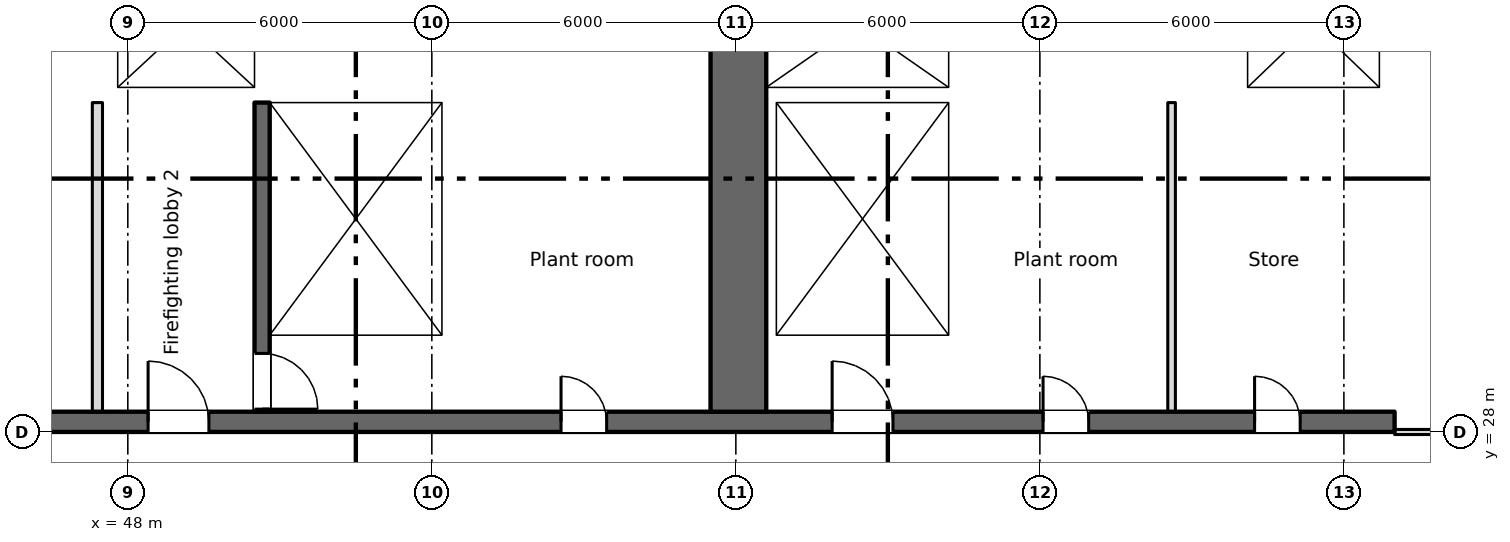
"""IFC4 building model, lengths in metres.
Left out: names, types, materials, properties, quantities, classifications, styles, units other than length and angle.
Written with IfcOpenShell. Run it as: python <this file> out.ifc"""

import sys

from ifc_helpers import new_model, si_unit, direction, frame, frame_2d, origin, place, context, subcontext, project, spatial, rectangle, extrude, element, fill, save


model = new_model("IFC4")
c1 = context("Model", 3, precision=1e-05, world=origin(), true_north=direction((0.0, 1.0)))
c2 = subcontext(c1, "Body", "Model", "MODEL_VIEW")
j1 = project(units=[si_unit("LENGTHUNIT", "METRE"), si_unit("PLANEANGLEUNIT", "RADIAN")], contexts=[c1])
p1 = place(None, origin())
s1 = spatial("IfcSite", under=j1, at=p1, CompositionType="ELEMENT")
p2 = place(p1, origin())
s2 = spatial("IfcBuilding", under=s1, at=p2, CompositionType="ELEMENT")
p3 = place(p2, frame((0.0, 0.0, -6.0)))
s3 = spatial("IfcBuildingStorey", under=s2, at=p3, CompositionType="ELEMENT", Elevation=-6.0)
p4 = place(p3, frame((6.7, 28.2, 0.0), z_axis=(0.0, 0.0, 1.0), x_axis=(1.0, 0.0, 0.0)))
e1 = element("IfcWall", 1, at=p4, inside=s3, PredefinedType="SHEAR", context=c2, shape_type="SweptSolid", body=[
    extrude(rectangle(XDim=66.3, YDim=0.4, at=frame_2d((33.15, 0.0))), origin(), (0.0, 0.0, 1.0), 5.55),
])
p5 = place(p4, frame((13.85, 0.0, 0.0)))
e2 = element("IfcOpeningElement", 2, at=p5, cuts=e1, PredefinedType="OPENING", context=c2, shape_type="SweptSolid", body=[
    extrude(rectangle(XDim=0.9, YDim=2.1, at=frame_2d((0.45, 1.05))), frame((0.0, 0.21, 0.0), z_axis=(0.0, -1.0, 0.0), x_axis=(1.0, 0.0, 0.0)), (0.0, 0.0, 1.0), 0.42),
])
p6 = place(p4, frame((49.85, 0.0, 0.0)))
e3 = element("IfcOpeningElement", 3, at=p6, cuts=e1, PredefinedType="OPENING", context=c2, shape_type="SweptSolid", body=[
    extrude(rectangle(XDim=0.9, YDim=2.1, at=frame_2d((0.45, 1.05))), frame((0.0, 0.21, 0.0), z_axis=(0.0, -1.0, 0.0), x_axis=(1.0, 0.0, 0.0)), (0.0, 0.0, 1.0), 0.42),
])
p7 = place(p4, frame((1.35, 0.0, 0.0)))
e4 = element("IfcOpeningElement", 4, at=p7, cuts=e1, PredefinedType="OPENING", context=c2, shape_type="SweptSolid", body=[
    extrude(rectangle(XDim=0.9, YDim=2.1, at=frame_2d((0.45, 1.05))), frame((0.0, 0.21, 0.0), z_axis=(0.0, -1.0, 0.0), x_axis=(1.0, 0.0, 0.0)), (0.0, 0.0, 1.0), 0.42),
])
p8 = place(p4, frame((59.363, 0.0, 0.0)))
e5 = element("IfcOpeningElement", 5, at=p8, cuts=e1, PredefinedType="OPENING", context=c2, shape_type="SweptSolid", body=[
    extrude(rectangle(XDim=0.9, YDim=2.1, at=frame_2d((0.45, 1.05))), frame((0.0, 0.21, 0.0), z_axis=(0.0, -1.0, 0.0), x_axis=(1.0, 0.0, 0.0)), (0.0, 0.0, 1.0), 0.42),
])
p9 = place(p4, frame((63.538, 0.0, 0.0)))
e6 = element("IfcOpeningElement", 6, at=p9, cuts=e1, PredefinedType="OPENING", context=c2, shape_type="SweptSolid", body=[
    extrude(rectangle(XDim=0.9, YDim=2.1, at=frame_2d((0.45, 1.05))), frame((0.0, 0.21, 0.0), z_axis=(0.0, -1.0, 0.0), x_axis=(1.0, 0.0, 0.0)), (0.0, 0.0, 1.0), 0.42),
])
p10 = place(p4, frame((4.7, 0.0, 0.0)))
e7 = element("IfcOpeningElement", 7, at=p10, cuts=e1, PredefinedType="OPENING", context=c2, shape_type="SweptSolid", body=[
    extrude(rectangle(XDim=1.2, YDim=2.1, at=frame_2d((0.6, 1.05))), frame((0.0, 0.21, 0.0), z_axis=(0.0, -1.0, 0.0), x_axis=(1.0, 0.0, 0.0)), (0.0, 0.0, 1.0), 0.42),
])
p11 = place(p4, frame((31.7, 0.0, 0.0)))
e8 = element("IfcOpeningElement", 8, at=p11, cuts=e1, PredefinedType="OPENING", context=c2, shape_type="SweptSolid", body=[
    extrude(rectangle(XDim=1.2, YDim=2.1, at=frame_2d((0.6, 1.05))), frame((0.0, 0.21, 0.0), z_axis=(0.0, -1.0, 0.0), x_axis=(1.0, 0.0, 0.0)), (0.0, 0.0, 1.0), 0.42),
])
p12 = place(p4, frame((55.2, 0.0, 0.0)))
e9 = element("IfcOpeningElement", 9, at=p12, cuts=e1, PredefinedType="OPENING", context=c2, shape_type="SweptSolid", body=[
    extrude(rectangle(XDim=1.2, YDim=2.1, at=frame_2d((0.6, 1.05))), frame((0.0, 0.21, 0.0), z_axis=(0.0, -1.0, 0.0), x_axis=(1.0, 0.0, 0.0)), (0.0, 0.0, 1.0), 0.42),
])
p13 = place(p4, frame((21.7, 0.0, 0.0)))
e10 = element("IfcOpeningElement", 10, at=p13, cuts=e1, PredefinedType="OPENING", context=c2, shape_type="SweptSolid", body=[
    extrude(rectangle(XDim=1.2, YDim=2.1, at=frame_2d((0.6, 1.05))), frame((0.0, 0.21, 0.0), z_axis=(0.0, -1.0, 0.0), x_axis=(1.0, 0.0, 0.0)), (0.0, 0.0, 1.0), 0.42),
])
p14 = place(p4, frame((41.7, 0.0, 0.0)))
e11 = element("IfcOpeningElement", 11, at=p14, cuts=e1, PredefinedType="OPENING", context=c2, shape_type="SweptSolid", body=[
    extrude(rectangle(XDim=1.2, YDim=2.1, at=frame_2d((0.6, 1.05))), frame((0.0, 0.21, 0.0), z_axis=(0.0, -1.0, 0.0), x_axis=(1.0, 0.0, 0.0)), (0.0, 0.0, 1.0), 0.42),
])
p15 = place(p4, frame((24.85, 0.0, 0.0)))
e12 = element("IfcOpeningElement", 12, at=p15, cuts=e1, PredefinedType="OPENING", context=c2, shape_type="SweptSolid", body=[
    extrude(rectangle(XDim=2.4, YDim=2.1, at=frame_2d((1.2, 1.05))), frame((0.0, 0.21, 0.0), z_axis=(0.0, -1.0, 0.0), x_axis=(1.0, 0.0, 0.0)), (0.0, 0.0, 1.0), 0.42),
])
p16 = place(p4, frame((37.35, 0.0, 0.0)))
e13 = element("IfcOpeningElement", 13, at=p16, cuts=e1, PredefinedType="OPENING", context=c2, shape_type="SweptSolid", body=[
    extrude(rectangle(XDim=2.4, YDim=2.1, at=frame_2d((1.2, 1.05))), frame((0.0, 0.21, 0.0), z_axis=(0.0, -1.0, 0.0), x_axis=(1.0, 0.0, 0.0)), (0.0, 0.0, 1.0), 0.42),
])
p17 = place(p4, frame((7.8, 0.0, 0.0)))
e14 = element("IfcOpeningElement", 14, at=p17, cuts=e1, PredefinedType="OPENING", context=c2, shape_type="SweptSolid", body=[
    extrude(rectangle(XDim=2.4, YDim=2.1, at=frame_2d((1.2, 1.05))), frame((0.0, 0.21, 0.0), z_axis=(0.0, -1.0, 0.0), x_axis=(1.0, 0.0, 0.0)), (0.0, 0.0, 1.0), 0.42),
])
p18 = place(p4, frame((28.85, 0.0, 0.0)))
e15 = element("IfcOpeningElement", 15, at=p18, cuts=e1, PredefinedType="OPENING", context=c2, shape_type="SweptSolid", body=[
    extrude(rectangle(XDim=0.9, YDim=2.1, at=frame_2d((0.45, 1.05))), frame((0.0, 0.21, 0.0), z_axis=(0.0, -1.0, 0.0), x_axis=(1.0, 0.0, 0.0)), (0.0, 0.0, 1.0), 0.42),
])
p19 = place(p4, frame((34.85, 0.0, 0.0)))
e16 = element("IfcOpeningElement", 16, at=p19, cuts=e1, PredefinedType="OPENING", context=c2, shape_type="SweptSolid", body=[
    extrude(rectangle(XDim=0.9, YDim=2.1, at=frame_2d((0.45, 1.05))), frame((0.0, 0.21, 0.0), z_axis=(0.0, -1.0, 0.0), x_axis=(1.0, 0.0, 0.0)), (0.0, 0.0, 1.0), 0.42),
])
p20 = place(p3, frame((72.85, 28.4, 0.0), z_axis=(0.0, 0.0, 1.0), x_axis=(0.0, 1.0, 0.0)))
e17 = element("IfcWall", 17, at=p20, inside=s3, PredefinedType="SHEAR", context=c2, shape_type="SweptSolid", body=[
    extrude(rectangle(XDim=17.1, YDim=0.3, at=frame_2d((8.55, 0.0))), origin(), (0.0, 0.0, 1.0), 5.55),
])
p21 = place(p3, frame((64.35, 34.8, 0.0), z_axis=(0.0, 0.0, 1.0), x_axis=(0.0, 1.0, 0.0)))
e18 = element("IfcWall", 18, at=p21, inside=s3, PredefinedType="SHEAR", context=c2, shape_type="SweptSolid", body=[
    extrude(rectangle(XDim=2.5, YDim=0.3, at=frame_2d((1.25, 0.0))), origin(), (0.0, 0.0, 1.0), 5.55),
])
p22 = place(p3, frame((60.05, 28.4, 0.0), z_axis=(0.0, 0.0, 1.0), x_axis=(0.0, 1.0, 0.0)))
e19 = element("IfcWall", 19, at=p22, inside=s3, PredefinedType="SHEAR", context=c2, shape_type="SweptSolid", body=[
    extrude(rectangle(XDim=17.1, YDim=1.1, at=frame_2d((8.55, 0.0))), origin(), (0.0, 0.0, 1.0), 5.55),
])
p23 = place(p22, frame((9.6, 0.0, 0.0)))
e20 = element("IfcOpeningElement", 20, at=p23, cuts=e19, PredefinedType="OPENING", context=c2, shape_type="SweptSolid", body=[
    extrude(rectangle(XDim=2.0, YDim=2.1, at=frame_2d((1.0, 1.05))), frame((0.0, 0.56, 0.0), z_axis=(0.0, -1.0, 0.0), x_axis=(1.0, 0.0, 0.0)), (0.0, 0.0, 1.0), 1.12),
])
p24 = place(p22, frame((15.45, 0.0, 0.0)))
e21 = element("IfcOpeningElement", 21, at=p24, cuts=e19, PredefinedType="OPENING", context=c2, shape_type="SweptSolid", body=[
    extrude(rectangle(XDim=1.2, YDim=2.1, at=frame_2d((0.6, 1.05))), frame((0.0, 0.56, 0.0), z_axis=(0.0, -1.0, 0.0), x_axis=(1.0, 0.0, 0.0)), (0.0, 0.0, 1.0), 1.12),
])
p25 = place(p3, frame((50.65, 34.5, 0.0), z_axis=(0.0, 0.0, 1.0), x_axis=(0.0, -1.0, 0.0)))
e22 = element("IfcWall", 22, at=p25, inside=s3, PredefinedType="SHEAR", context=c2, shape_type="SweptSolid", body=[
    extrude(rectangle(XDim=6.1, YDim=0.3, at=frame_2d((3.05, 0.0))), origin(), (0.0, 0.0, 1.0), 5.55),
])
p26 = place(p25, frame((4.95, 0.0, 0.0)))
e23 = element("IfcOpeningElement", 23, at=p26, cuts=e22, PredefinedType="OPENING", context=c2, shape_type="SweptSolid", body=[
    extrude(rectangle(XDim=1.1, YDim=2.1, at=frame_2d((0.55, 1.05))), frame((0.0, 0.16, 0.0), z_axis=(0.0, -1.0, 0.0), x_axis=(1.0, 0.0, 0.0)), (0.0, 0.0, 1.0), 0.32),
])
p27 = place(p3, frame((54.35, 28.4, 0.0), z_axis=(0.0, 0.0, 1.0), x_axis=(0.0, 1.0, 0.0)))
e24 = element("IfcWall", 24, at=p27, inside=s3, PredefinedType="SHEAR", context=c2, shape_type="SweptSolid", body=[
    extrude(rectangle(XDim=6.1, YDim=0.3, at=frame_2d((3.05, 0.0))), origin(), (0.0, 0.0, 1.0), 5.55),
])
p28 = place(p3, frame((60.7, 28.4, 0.0), z_axis=(0.0, 0.0, 1.0), x_axis=(0.0, 1.0, 0.0)))
e25 = element("IfcWall", 25, at=p28, inside=s3, PredefinedType="SHEAR", context=c2, shape_type="SweptSolid", body=[
    extrude(rectangle(XDim=6.1, YDim=0.2, at=frame_2d((3.05, 0.0))), origin(), (0.0, 0.0, 1.0), 5.55),
])
p29 = place(p3, frame((64.35, 28.4, 0.0), z_axis=(0.0, 0.0, 1.0), x_axis=(0.0, 1.0, 0.0)))
e26 = element("IfcWall", 26, at=p29, inside=s3, PredefinedType="SHEAR", context=c2, shape_type="SweptSolid", body=[
    extrude(rectangle(XDim=6.1, YDim=0.3, at=frame_2d((3.05, 0.0))), origin(), (0.0, 0.0, 1.0), 5.55),
])
p30 = place(p3, frame((47.3, 34.65, 0.0), z_axis=(0.0, 0.0, 1.0), x_axis=(1.0, 0.0, 0.0)))
e27 = element("IfcWall", 27, at=p30, inside=s3, PredefinedType="SHEAR", context=c2, shape_type="SweptSolid", body=[
    extrude(rectangle(XDim=12.2, YDim=0.3, at=frame_2d((6.1, 0.0))), origin(), (0.0, 0.0, 1.0), 5.55),
])
p31 = place(p30, frame((1.3, 0.0, 0.0)))
e28 = element("IfcOpeningElement", 28, at=p31, cuts=e27, PredefinedType="OPENING", context=c2, shape_type="SweptSolid", body=[
    extrude(rectangle(XDim=1.1, YDim=2.1, at=frame_2d((0.55, 1.05))), frame((0.0, 0.16, 0.0), z_axis=(0.0, -1.0, 0.0), x_axis=(1.0, 0.0, 0.0)), (0.0, 0.0, 1.0), 0.32),
])
p32 = place(p3, frame((60.6, 34.65, 0.0), z_axis=(0.0, 0.0, 1.0), x_axis=(1.0, 0.0, 0.0)))
e29 = element("IfcWall", 29, at=p32, inside=s3, PredefinedType="SHEAR", context=c2, shape_type="SweptSolid", body=[
    extrude(rectangle(XDim=12.1, YDim=0.3, at=frame_2d((6.05, 0.0))), origin(), (0.0, 0.0, 1.0), 5.55),
])
p33 = place(p3, frame((47.55, 34.8, 0.0), z_axis=(0.0, 0.0, 1.0), x_axis=(0.0, 1.0, 0.0)))
e30 = element("IfcWall", 30, at=p33, inside=s3, PredefinedType="SHEAR", context=c2, shape_type="SweptSolid", body=[
    extrude(rectangle(XDim=2.5, YDim=0.5, at=frame_2d((1.25, 0.0))), origin(), (0.0, 0.0, 1.0), 5.55),
])
for number, where, z_axis, x_axis in (
    (31, (50.65, 34.8, 0.0), (0.0, 0.0, 1.0), (0.0, 1.0, 0.0)),
    (32, (67.15, 34.8, 0.0), (0.0, 0.0, 1.0), (0.0, 1.0, 0.0)),
    (33, (69.95, 34.8, 0.0), (0.0, 0.0, 1.0), (0.0, 1.0, 0.0)),
):
    element("IfcWall", number, at=place(p3, frame(where, z_axis=z_axis, x_axis=x_axis)), inside=s3, PredefinedType="SHEAR", context=c2, shape_type="SweptSolid", body=[
        extrude(rectangle(XDim=2.5, YDim=0.3, at=frame_2d((1.25, 0.0))), origin(), (0.0, 0.0, 1.0), 5.55),
    ])
p34 = place(p3, frame((47.4, 28.4, 0.0), z_axis=(0.0, 0.0, 1.0), x_axis=(0.0, 1.0, 0.0)))
e34 = element("IfcWall", 34, at=p34, inside=s3, PredefinedType="PARTITIONING", context=c2, shape_type="SweptSolid", body=[
    extrude(rectangle(XDim=6.1, YDim=0.2, at=frame_2d((3.05, 0.0))), origin(), (0.0, 0.0, 1.0), 5.55),
])
p35 = place(p3, frame((68.6, 28.4, 0.0), z_axis=(0.0, 0.0, 1.0), x_axis=(0.0, 1.0, 0.0)))
e35 = element("IfcWall", 35, at=p35, inside=s3, PredefinedType="PARTITIONING", context=c2, shape_type="SweptSolid", body=[
    extrude(rectangle(XDim=6.1, YDim=0.15, at=frame_2d((3.05, 0.0))), origin(), (0.0, 0.0, 1.0), 5.55),
])
p36 = place(p3, frame((73.0, 28.0, 0.0), z_axis=(0.0, 0.0, 1.0), x_axis=(1.0, 0.0, 0.0)))
e36 = element("IfcWall", 36, at=p36, inside=s3, PredefinedType="PARTITIONING", context=c2, shape_type="SweptSolid", body=[
    extrude(rectangle(XDim=6.0, YDim=0.1, at=frame_2d((3.0, 0.0))), origin(), (0.0, 0.0, 1.0), 5.55),
])
p37 = place(p36, frame((2.5, 0.0, 0.0)))
e37 = element("IfcOpeningElement", 37, at=p37, cuts=e36, PredefinedType="OPENING", context=c2, shape_type="SweptSolid", body=[
    extrude(rectangle(XDim=1.0, YDim=2.1, at=frame_2d((0.5, 1.05))), frame((0.0, 0.06, 0.0), z_axis=(0.0, -1.0, 0.0), x_axis=(1.0, 0.0, 0.0)), (0.0, 0.0, 1.0), 0.12),
])
p38 = place(p6, origin())
e38 = element("IfcDoor", 38, at=p38, inside=s3, OperationType="SINGLE_SWING_LEFT", PredefinedType="DOOR", context=c2, shape_type="SweptSolid", body=[
    extrude(rectangle(XDim=0.9, YDim=2.1, at=frame_2d((0.45, 1.05))), frame((0.0, 0.025, 0.0), z_axis=(0.0, -1.0, 0.0), x_axis=(1.0, 0.0, 0.0)), (0.0, 0.0, 1.0), 0.05),
])
fill(e3, e38)
p39 = place(p8, origin())
e39 = element("IfcDoor", 39, at=p39, inside=s3, OperationType="SINGLE_SWING_LEFT", PredefinedType="DOOR", context=c2, shape_type="SweptSolid", body=[
    extrude(rectangle(XDim=0.9, YDim=2.1, at=frame_2d((0.45, 1.05))), frame((0.0, 0.025, 0.0), z_axis=(0.0, -1.0, 0.0), x_axis=(1.0, 0.0, 0.0)), (0.0, 0.0, 1.0), 0.05),
])
fill(e5, e39)
p40 = place(p9, origin())
e40 = element("IfcDoor", 40, at=p40, inside=s3, OperationType="SINGLE_SWING_LEFT", PredefinedType="DOOR", context=c2, shape_type="SweptSolid", body=[
    extrude(rectangle(XDim=0.9, YDim=2.1, at=frame_2d((0.45, 1.05))), frame((0.0, 0.025, 0.0), z_axis=(0.0, -1.0, 0.0), x_axis=(1.0, 0.0, 0.0)), (0.0, 0.0, 1.0), 0.05),
])
fill(e6, e40)
p41 = place(p31, origin())
e41 = element("IfcDoor", 41, at=p41, inside=s3, OperationType="SLIDING_TO_LEFT", PredefinedType="DOOR", context=c2, shape_type="SweptSolid", body=[
    extrude(rectangle(XDim=1.1, YDim=2.1, at=frame_2d((0.55, 1.05))), frame((0.0, 0.025, 0.0), z_axis=(0.0, -1.0, 0.0), x_axis=(1.0, 0.0, 0.0)), (0.0, 0.0, 1.0), 0.05),
])
fill(e28, e41)
p42 = place(p26, origin())
e42 = element("IfcDoor", 42, at=p42, inside=s3, OperationType="SINGLE_SWING_RIGHT", PredefinedType="DOOR", context=c2, shape_type="SweptSolid", body=[
    extrude(rectangle(XDim=1.1, YDim=2.1, at=frame_2d((0.55, 1.05))), frame((0.0, 0.025, 0.0), z_axis=(0.0, -1.0, 0.0), x_axis=(1.0, 0.0, 0.0)), (0.0, 0.0, 1.0), 0.05),
])
fill(e23, e42)
p43 = place(p12, origin())
e43 = element("IfcDoor", 43, at=p43, inside=s3, OperationType="SINGLE_SWING_LEFT", PredefinedType="DOOR", context=c2, shape_type="SweptSolid", body=[
    extrude(rectangle(XDim=1.2, YDim=2.1, at=frame_2d((0.6, 1.05))), frame((0.0, 0.025, 0.0), z_axis=(0.0, -1.0, 0.0), x_axis=(1.0, 0.0, 0.0)), (0.0, 0.0, 1.0), 0.05),
])
fill(e9, e43)
p44 = place(p14, origin())
e44 = element("IfcDoor", 44, at=p44, inside=s3, OperationType="SINGLE_SWING_LEFT", PredefinedType="DOOR", context=c2, shape_type="SweptSolid", body=[
    extrude(rectangle(XDim=1.2, YDim=2.1, at=frame_2d((0.6, 1.05))), frame((0.0, 0.025, 0.0), z_axis=(0.0, -1.0, 0.0), x_axis=(1.0, 0.0, 0.0)), (0.0, 0.0, 1.0), 0.05),
])
fill(e11, e44)
save(model, sys.argv[1])
